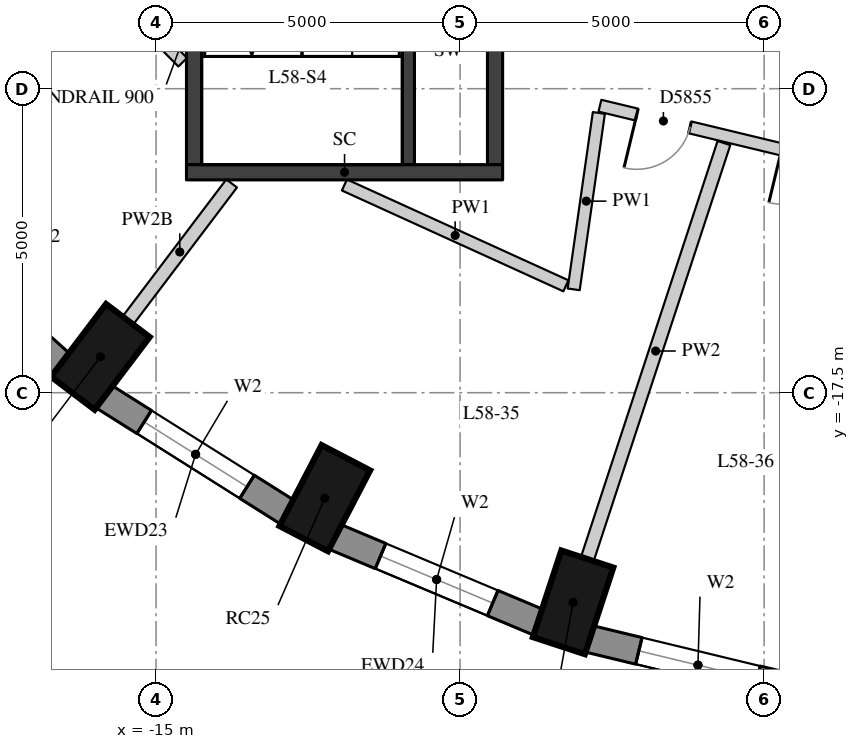
"""IFC4 building model, lengths in metres.
Left out: names, types, materials, properties, quantities, classifications, styles, units other than length and angle.
Written with IfcOpenShell. Run it as: python <this file> out.ifc"""

import sys

from ifc_helpers import new_model, si_unit, direction, frame, frame_2d, origin, origin_2d, place, context, subcontext, project, spatial, rectangle, extrude, element, fill, save


model = new_model("IFC4")
c1 = context("Model", 3, precision=1e-05, world=origin(), true_north=direction((0.0, 1.0)))
c2 = subcontext(c1, "Body", "Model", "MODEL_VIEW")
j1 = project(units=[si_unit("LENGTHUNIT", "METRE"), si_unit("PLANEANGLEUNIT", "RADIAN")], contexts=[c1])
p1 = place(None, origin())
s1 = spatial("IfcSite", under=j1, at=p1, CompositionType="ELEMENT")
p2 = place(p1, origin())
s2 = spatial("IfcBuilding", under=s1, at=p2, CompositionType="ELEMENT")
p3 = place(p2, frame((0.0, 0.0, 205.7)))
s3 = spatial("IfcBuildingStorey", under=s2, at=p3, CompositionType="ELEMENT", Elevation=205.7)
for number, where, z_axis, x_axis in (
    (1, (-15.916, -16.911, 0.0), (0.0, 0.0, 1.0), (-0.604, -0.797, 0.0)),
    (2, (-12.225, -19.235, 0.0), (0.0, 0.0, 1.0), (-0.462, -0.887, 0.0)),
    (3, (-8.141, -20.948, 0.0), (0.0, 0.0, 1.0), (-0.312, -0.95, 0.0)),
):
    element("IfcColumn", number, at=place(p3, frame(where, z_axis=z_axis, x_axis=x_axis)), inside=s3, PredefinedType="COLUMN", context=c2, shape_type="SweptSolid", body=[
        extrude(rectangle(XDim=1.5, YDim=0.9, at=origin_2d()), origin(), (0.0, 0.0, 1.0), 3.3),
    ])
p4 = place(p3, frame((-19.165, -14.69, 0.0), z_axis=(0.0, 0.0, 1.0), x_axis=(0.743442727602, -0.668799604348, 0.0)))
e4 = element("IfcWall", 4, at=p4, inside=s3, PredefinedType="SOLIDWALL", context=c2, shape_type="SweptSolid", body=[
    extrude(rectangle(XDim=3.513, YDim=0.45, at=frame_2d((1.756, 0.0))), origin(), (0.0, 0.0, 1.0), 3.02),
])
p5 = place(p4, frame((0.756, 0.0, 0.4)))
e5 = element("IfcOpeningElement", 5, at=p5, cuts=e4, PredefinedType="OPENING", context=c2, shape_type="SweptSolid", body=[
    extrude(rectangle(XDim=2.0, YDim=1.75, at=frame_2d((1.0, 0.875))), frame((0.0, 0.235, 0.0), z_axis=(0.0, -1.0, 0.0), x_axis=(1.0, 0.0, 0.0)), (0.0, 0.0, 1.0), 0.47),
])
p6 = place(p3, frame((-15.867, -17.559, 0.0), z_axis=(0.0, 0.0, 1.0), x_axis=(0.84616917791, -0.532914366813, 0.0)))
e6 = element("IfcWall", 6, at=p6, inside=s3, PredefinedType="SOLIDWALL", context=c2, shape_type="SweptSolid", body=[
    extrude(rectangle(XDim=3.587, YDim=0.45, at=frame_2d((1.793, 0.0))), origin(), (0.0, 0.0, 1.0), 3.02),
])
p7 = place(p6, frame((0.793, 0.0, 0.4)))
e7 = element("IfcOpeningElement", 7, at=p7, cuts=e6, PredefinedType="OPENING", context=c2, shape_type="SweptSolid", body=[
    extrude(rectangle(XDim=2.0, YDim=1.75, at=frame_2d((1.0, 0.875))), frame((0.0, 0.235, 0.0), z_axis=(0.0, -1.0, 0.0), x_axis=(1.0, 0.0, 0.0)), (0.0, 0.0, 1.0), 0.47),
])
p8 = place(p3, frame((-12.069, -19.867, 0.0), z_axis=(0.0, 0.0, 1.0), x_axis=(0.922168222612, -0.386789050006, 0.0)))
e8 = element("IfcWall", 8, at=p8, inside=s3, PredefinedType="SOLIDWALL", context=c2, shape_type="SweptSolid", body=[
    extrude(rectangle(XDim=3.651, YDim=0.45, at=frame_2d((1.825, 0.0))), origin(), (0.0, 0.0, 1.0), 3.02),
])
p9 = place(p8, frame((0.825, 0.0, 0.4)))
e9 = element("IfcOpeningElement", 9, at=p9, cuts=e8, PredefinedType="OPENING", context=c2, shape_type="SweptSolid", body=[
    extrude(rectangle(XDim=2.0, YDim=1.75, at=frame_2d((1.0, 0.875))), frame((0.0, 0.235, 0.0), z_axis=(0.0, -1.0, 0.0), x_axis=(1.0, 0.0, 0.0)), (0.0, 0.0, 1.0), 0.47),
])
p10 = place(p3, frame((-7.885, -21.547, 0.0), z_axis=(0.0, 0.0, 1.0), x_axis=(0.9721584944, -0.234324266275, 0.0)))
e10 = element("IfcWall", 10, at=p10, inside=s3, PredefinedType="SOLIDWALL", context=c2, shape_type="SweptSolid", body=[
    extrude(rectangle(XDim=3.698, YDim=0.45, at=frame_2d((1.849, 0.0))), origin(), (0.0, 0.0, 1.0), 3.02),
])
p11 = place(p10, frame((0.849, 0.0, 0.4)))
e11 = element("IfcOpeningElement", 11, at=p11, cuts=e10, PredefinedType="OPENING", context=c2, shape_type="SweptSolid", body=[
    extrude(rectangle(XDim=2.0, YDim=1.75, at=frame_2d((1.0, 0.875))), frame((0.0, 0.235, 0.0), z_axis=(0.0, -1.0, 0.0), x_axis=(1.0, 0.0, 0.0)), (0.0, 0.0, 1.0), 0.47),
])
p12 = place(p3, frame((-10.85, -13.75, 0.0), z_axis=(0.0, 0.0, 1.0), x_axis=(0.0, 1.0, 0.0)))
e12 = element("IfcWall", 12, at=p12, inside=s3, PredefinedType="SHEAR", context=c2, shape_type="SweptSolid", body=[
    extrude(rectangle(XDim=6.0, YDim=0.2, at=frame_2d((3.0, 0.0))), origin(), (0.0, 0.0, 1.0), 3.02),
])
p13 = place(p12, frame((4.4, 0.0, 0.0)))
e13 = element("IfcOpeningElement", 13, at=p13, cuts=e12, PredefinedType="OPENING", context=c2, shape_type="SweptSolid", body=[
    extrude(rectangle(XDim=1.5, YDim=2.1, at=frame_2d((0.75, 1.05))), frame((0.0, 0.11, 0.0), z_axis=(0.0, -1.0, 0.0), x_axis=(1.0, 0.0, 0.0)), (0.0, 0.0, 1.0), 0.22),
])
p14 = place(p3, frame((-14.375, -13.75, -0.28), z_axis=(0.0, 0.0, 1.0), x_axis=(0.0, 1.0, 0.0)))
e14 = element("IfcWall", 14, at=p14, inside=s3, PredefinedType="SHEAR", context=c2, shape_type="SweptSolid", body=[
    extrude(rectangle(XDim=6.0, YDim=0.25, at=frame_2d((3.0, 0.0))), origin(), (0.0, 0.0, 1.0), 3.3),
])
p15 = place(p3, frame((-9.425, -13.75, -0.28), z_axis=(0.0, 0.0, 1.0), x_axis=(0.0, 1.0, 0.0)))
e15 = element("IfcWall", 15, at=p15, inside=s3, PredefinedType="SHEAR", context=c2, shape_type="SweptSolid", body=[
    extrude(rectangle(XDim=6.0, YDim=0.25, at=frame_2d((3.0, 0.0))), origin(), (0.0, 0.0, 1.0), 3.3),
])
p16 = place(p15, frame((2.4, 0.0, 0.28)))
e16 = element("IfcOpeningElement", 16, at=p16, cuts=e15, PredefinedType="OPENING", context=c2, shape_type="SweptSolid", body=[
    extrude(rectangle(XDim=1.5, YDim=2.1, at=frame_2d((0.75, 1.05))), frame((0.0, 0.135, 0.0), z_axis=(0.0, -1.0, 0.0), x_axis=(1.0, 0.0, 0.0)), (0.0, 0.0, 1.0), 0.27),
])
p17 = place(p3, frame((-14.5, -13.875, -0.28), z_axis=(0.0, 0.0, 1.0), x_axis=(1.0, 0.0, 0.0)))
e17 = element("IfcWall", 17, at=p17, inside=s3, PredefinedType="SHEAR", context=c2, shape_type="SweptSolid", body=[
    extrude(rectangle(XDim=5.2, YDim=0.25, at=frame_2d((2.6, 0.0))), origin(), (0.0, 0.0, 1.0), 3.3),
])
p18 = place(p3, frame((0.602, -14.777, 0.0), z_axis=(0.0, 0.0, 1.0), x_axis=(-0.972266752798, 0.23387467029, 0.0)))
e18 = element("IfcWall", 18, at=p18, inside=s3, PredefinedType="PARTITIONING", context=c2, shape_type="SweptSolid", body=[
    extrude(rectangle(XDim=8.539, YDim=0.2, at=frame_2d((4.27, 0.0))), origin(), (0.0, 0.0, 1.0), 2.42),
])
p19 = place(p18, frame((7.016, 0.0, 0.0)))
e19 = element("IfcOpeningElement", 19, at=p19, cuts=e18, PredefinedType="OPENING", context=c2, shape_type="SweptSolid", body=[
    extrude(rectangle(XDim=0.9, YDim=2.1, at=frame_2d((0.45, 1.05))), frame((0.0, 0.11, 0.0), z_axis=(0.0, -1.0, 0.0), x_axis=(1.0, 0.0, 0.0)), (0.0, 0.0, 1.0), 0.22),
])
p20 = place(p18, frame((4.565, 0.0, 0.0)))
e20 = element("IfcOpeningElement", 20, at=p20, cuts=e18, PredefinedType="OPENING", context=c2, shape_type="SweptSolid", body=[
    extrude(rectangle(XDim=0.9, YDim=2.1, at=frame_2d((0.45, 1.05))), frame((0.0, 0.11, 0.0), z_axis=(0.0, -1.0, 0.0), x_axis=(1.0, 0.0, 0.0)), (0.0, 0.0, 1.0), 0.22),
])
p21 = place(p18, frame((1.78, 0.0, 0.0)))
e21 = element("IfcOpeningElement", 21, at=p21, cuts=e18, PredefinedType="OPENING", context=c2, shape_type="SweptSolid", body=[
    extrude(rectangle(XDim=0.9, YDim=2.1, at=frame_2d((0.45, 1.05))), frame((0.0, 0.11, 0.0), z_axis=(0.0, -1.0, 0.0), x_axis=(1.0, 0.0, 0.0)), (0.0, 0.0, 1.0), 0.22),
])
p22 = place(p3, frame((-7.718, -12.898, 0.0), z_axis=(0.0, 0.0, 1.0), x_axis=(-0.141269756138, -0.989971138974, 0.0)))
e22 = element("IfcWall", 22, at=p22, inside=s3, PredefinedType="PARTITIONING", context=c2, shape_type="SweptSolid", body=[
    extrude(rectangle(XDim=2.931, YDim=0.2, at=frame_2d((1.465, 0.0))), origin(), (0.0, 0.0, 1.0), 3.02),
])
p23 = place(p3, frame((-8.26, -15.742, 0.0), z_axis=(0.0, 0.0, 1.0), x_axis=(-0.910075871217, 0.414441683025, 0.0)))
e23 = element("IfcWall", 23, at=p23, inside=s3, PredefinedType="PARTITIONING", context=c2, shape_type="SweptSolid", body=[
    extrude(rectangle(XDim=4.002, YDim=0.2, at=frame_2d((2.001, 0.0))), origin(), (0.0, 0.0, 1.0), 3.02),
])
p24 = place(p3, frame((-14.562, -12.064, 0.0), z_axis=(0.0, 0.0, 1.0), x_axis=(-0.704826289083, 0.709379942074, 0.0)))
e24 = element("IfcWall", 24, at=p24, inside=s3, PredefinedType="PARTITIONING", context=c2, shape_type="SweptSolid", body=[
    extrude(rectangle(XDim=2.466, YDim=0.2, at=frame_2d((1.233, 0.0))), origin(), (0.0, 0.0, 1.0), 3.02),
])
p25 = place(p3, frame((-15.463, -16.312, 0.0), z_axis=(0.0, 0.0, 1.0), x_axis=(0.603613294085, 0.797277236101, 0.0)))
e25 = element("IfcWall", 25, at=p25, inside=s3, PredefinedType="PARTITIONING", context=c2, shape_type="SweptSolid", body=[
    extrude(rectangle(XDim=2.828, YDim=0.22, at=frame_2d((1.414, 0.0))), origin(), (0.0, 0.0, 1.0), 2.57),
])
p26 = place(p3, frame((-7.907, -20.235, 0.0), z_axis=(0.0, 0.0, 1.0), x_axis=(0.312013837279, 0.950077557543, 0.0)))
e26 = element("IfcWall", 26, at=p26, inside=s3, PredefinedType="PARTITIONING", context=c2, shape_type="SweptSolid", body=[
    extrude(rectangle(XDim=7.201, YDim=0.22, at=frame_2d((3.601, 0.0))), origin(), (0.0, 0.0, 1.0), 3.02),
])
p27 = place(p7, origin())
e27 = element("IfcWindow", 27, at=p27, inside=s3, PartitioningType="SINGLE_PANEL", PredefinedType="WINDOW", context=c2, shape_type="SweptSolid", body=[
    extrude(rectangle(XDim=2.0, YDim=1.75, at=frame_2d((1.0, 0.875))), frame((0.0, 0.035, 0.0), z_axis=(0.0, -1.0, 0.0), x_axis=(1.0, 0.0, 0.0)), (0.0, 0.0, 1.0), 0.06),
])
fill(e7, e27)
p28 = place(p9, origin())
e28 = element("IfcWindow", 28, at=p28, inside=s3, PartitioningType="SINGLE_PANEL", PredefinedType="WINDOW", context=c2, shape_type="SweptSolid", body=[
    extrude(rectangle(XDim=2.0, YDim=1.75, at=frame_2d((1.0, 0.875))), frame((0.0, 0.035, 0.0), z_axis=(0.0, -1.0, 0.0), x_axis=(1.0, 0.0, 0.0)), (0.0, 0.0, 1.0), 0.06),
])
fill(e9, e28)
p29 = place(p11, origin())
e29 = element("IfcWindow", 29, at=p29, inside=s3, PartitioningType="SINGLE_PANEL", PredefinedType="WINDOW", context=c2, shape_type="SweptSolid", body=[
    extrude(rectangle(XDim=2.0, YDim=1.75, at=frame_2d((1.0, 0.875))), frame((0.0, 0.035, 0.0), z_axis=(0.0, -1.0, 0.0), x_axis=(1.0, 0.0, 0.0)), (0.0, 0.0, 1.0), 0.06),
])
fill(e11, e29)
p30 = place(p19, origin())
e30 = element("IfcDoor", 30, at=p30, inside=s3, OperationType="SINGLE_SWING_RIGHT", PredefinedType="DOOR", context=c2, shape_type="SweptSolid", body=[
    extrude(rectangle(XDim=0.9, YDim=2.1, at=frame_2d((0.45, 1.05))), frame((0.0, 0.025, 0.0), z_axis=(0.0, -1.0, 0.0), x_axis=(1.0, 0.0, 0.0)), (0.0, 0.0, 1.0), 0.05),
])
fill(e19, e30)
save(model, sys.argv[1])
